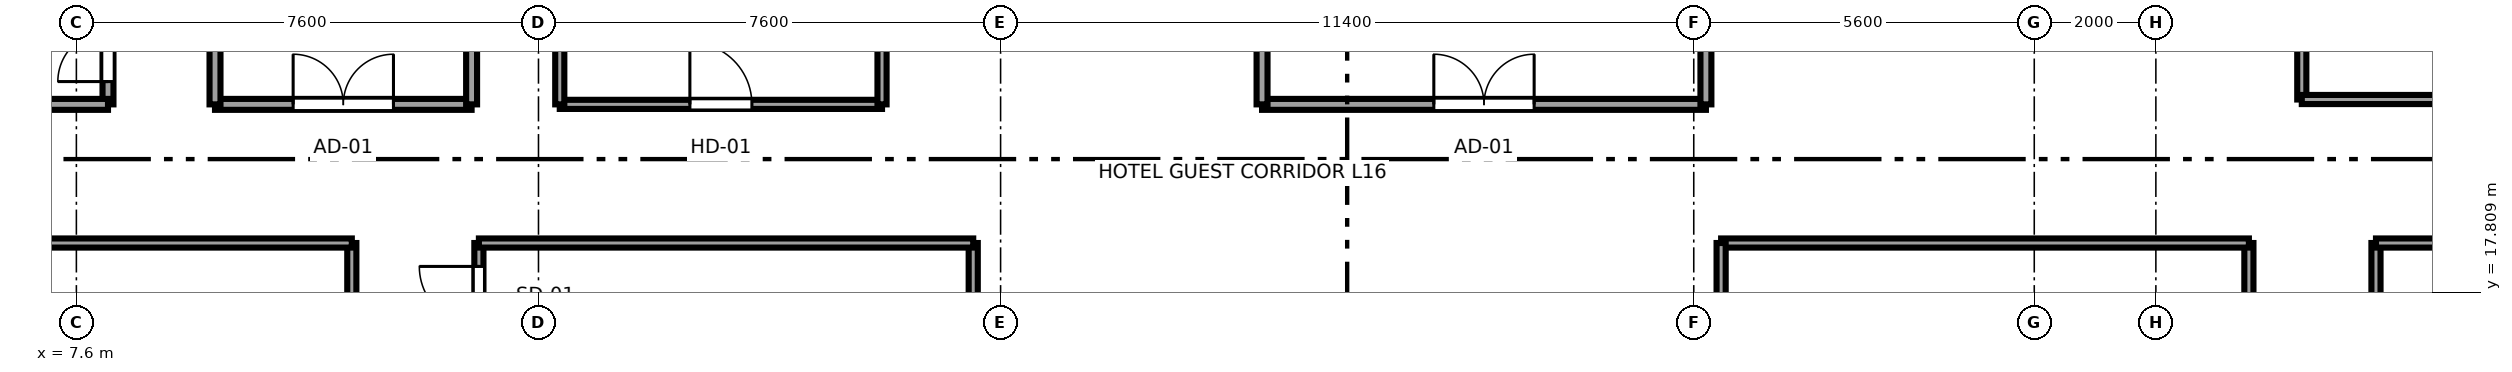
"""IFC4 building model, lengths in metres.
Left out: names, types, materials, properties, quantities, classifications, styles, units other than length and angle.
Written with IfcOpenShell. Run it as: python <this file> out.ifc"""

import sys

from ifc_helpers import new_model, si_unit, direction, frame, frame_2d, origin, place, context, subcontext, project, spatial, rectangle, extrude, source, transform, mapped, element, fill, save


model = new_model("IFC4")
c1 = context("Model", 3, precision=1e-05, world=origin(), true_north=direction((0.0, 1.0)))
c2 = subcontext(c1, "Body", "Model", "MODEL_VIEW")
j1 = project(units=[si_unit("LENGTHUNIT", "METRE"), si_unit("PLANEANGLEUNIT", "RADIAN")], contexts=[c1])
p1 = place(None, origin())
s1 = spatial("IfcSite", under=j1, at=p1, CompositionType="ELEMENT")
p2 = place(p1, origin())
s2 = spatial("IfcBuilding", under=s1, at=p2, CompositionType="ELEMENT")
p3 = place(p2, frame((0.0, 0.0, 67.5)))
s3 = spatial("IfcBuildingStorey", under=s2, at=p3, CompositionType="ELEMENT", Elevation=67.5)
p4 = place(p3, frame((12.13, 11.81, 0.0), z_axis=(0.0, 0.0, 1.0), x_axis=(0.0, 1.0, 0.0)))
e1 = element("IfcWall", 1, at=p4, inside=s3, PredefinedType="PARTITIONING", context=c2, shape_type="SweptSolid", body=[
    extrude(rectangle(XDim=6.81, YDim=0.15, at=frame_2d((3.405, 0.0))), origin(), (0.0, 0.0, 1.0), 3.37),
])
p5 = place(p4, frame((2.895, 0.0, 0.0)))
e2 = element("IfcOpeningElement", 2, at=p5, cuts=e1, PredefinedType="OPENING", context=c2, shape_type="SweptSolid", body=[
    extrude(rectangle(XDim=0.98, YDim=2.12, at=frame_2d((0.49, 1.06))), frame((0.0, 0.085, 0.0), z_axis=(0.0, -1.0, 0.0), x_axis=(1.0, 0.0, 0.0)), (0.0, 0.0, 1.0), 0.17),
])
p6 = place(p3, frame((0.405, 18.62, 0.0), z_axis=(0.0, 0.0, 1.0), x_axis=(1.0, 0.0, 0.0)))
e3 = element("IfcWall", 3, at=p6, inside=s3, PredefinedType="PARTITIONING", context=c2, shape_type="SweptSolid", body=[
    extrude(rectangle(XDim=11.725, YDim=0.15, at=frame_2d((5.862, 0.0))), origin(), (0.0, 0.0, 1.0), 3.37),
])
p7 = place(p3, frame((14.22, 15.01, 0.0), z_axis=(0.0, 0.0, 1.0), x_axis=(0.0, 1.0, 0.0)))
e4 = element("IfcWall", 4, at=p7, inside=s3, PredefinedType="PARTITIONING", context=c2, shape_type="SweptSolid", body=[
    extrude(rectangle(XDim=3.61, YDim=0.15, at=frame_2d((1.805, 0.0))), origin(), (0.0, 0.0, 1.0), 3.37),
])
p8 = place(p7, frame((2.245, 0.0, 0.0)))
e5 = element("IfcOpeningElement", 5, at=p8, cuts=e4, PredefinedType="OPENING", context=c2, shape_type="SweptSolid", body=[
    extrude(rectangle(XDim=0.98, YDim=2.12, at=frame_2d((0.49, 1.06))), frame((0.0, 0.085, 0.0), z_axis=(0.0, -1.0, 0.0), x_axis=(1.0, 0.0, 0.0)), (0.0, 0.0, 1.0), 0.17),
])
p9 = place(p3, frame((22.35, 12.68, 0.0), z_axis=(0.0, 0.0, 1.0), x_axis=(0.0, 1.0, 0.0)))
e6 = element("IfcWall", 6, at=p9, inside=s3, PredefinedType="PARTITIONING", context=c2, shape_type="SweptSolid", body=[
    extrude(rectangle(XDim=5.94, YDim=0.15, at=frame_2d((2.97, 0.0))), origin(), (0.0, 0.0, 1.0), 3.37),
])
p10 = place(p3, frame((14.22, 18.62, 0.0), z_axis=(0.0, 0.0, 1.0), x_axis=(1.0, 0.0, 0.0)))
e7 = element("IfcWall", 7, at=p10, inside=s3, PredefinedType="PARTITIONING", context=c2, shape_type="SweptSolid", body=[
    extrude(rectangle(XDim=8.13, YDim=0.15, at=frame_2d((4.065, 0.0))), origin(), (0.0, 0.0, 1.0), 3.37),
])
p11 = place(p3, frame((43.33, 11.61, 0.0), z_axis=(0.0, 0.0, 1.0), x_axis=(0.0, 1.0, 0.0)))
e8 = element("IfcWall", 8, at=p11, inside=s3, PredefinedType="PARTITIONING", context=c2, shape_type="SweptSolid", body=[
    extrude(rectangle(XDim=7.01, YDim=0.15, at=frame_2d((3.505, 0.0))), origin(), (0.0, 0.0, 1.0), 3.37),
])
p12 = place(p11, frame((2.995, 0.0, 0.0)))
e9 = element("IfcOpeningElement", 9, at=p12, cuts=e8, PredefinedType="OPENING", context=c2, shape_type="SweptSolid", body=[
    extrude(rectangle(XDim=0.98, YDim=2.12, at=frame_2d((0.49, 1.06))), frame((0.0, 0.085, 0.0), z_axis=(0.0, -1.0, 0.0), x_axis=(1.0, 0.0, 0.0)), (0.0, 0.0, 1.0), 0.17),
])
p13 = place(p3, frame((34.65, 18.62, 0.0), z_axis=(0.0, 0.0, 1.0), x_axis=(1.0, 0.0, 0.0)))
e10 = element("IfcWall", 10, at=p13, inside=s3, PredefinedType="PARTITIONING", context=c2, shape_type="SweptSolid", body=[
    extrude(rectangle(XDim=8.68, YDim=0.15, at=frame_2d((4.34, 0.0))), origin(), (0.0, 0.0, 1.0), 3.37),
])
p14 = place(p3, frame((34.65, 9.28, 0.0), z_axis=(0.0, 0.0, 1.0), x_axis=(0.0, 1.0, 0.0)))
e11 = element("IfcWall", 11, at=p14, inside=s3, PredefinedType="PARTITIONING", context=c2, shape_type="SweptSolid", body=[
    extrude(rectangle(XDim=9.34, YDim=0.15, at=frame_2d((4.67, 0.0))), origin(), (0.0, 0.0, 1.0), 3.37),
])
p15 = place(p3, frame((45.42, 15.81, 0.0), z_axis=(0.0, 0.0, 1.0), x_axis=(0.0, 1.0, 0.0)))
e12 = element("IfcWall", 12, at=p15, inside=s3, PredefinedType="PARTITIONING", context=c2, shape_type="SweptSolid", body=[
    extrude(rectangle(XDim=2.81, YDim=0.15, at=frame_2d((1.405, 0.0))), origin(), (0.0, 0.0, 1.0), 3.37),
])
p16 = place(p15, frame((0.895, 0.0, 0.0)))
e13 = element("IfcOpeningElement", 13, at=p16, cuts=e12, PredefinedType="OPENING", context=c2, shape_type="SweptSolid", body=[
    extrude(rectangle(XDim=0.98, YDim=2.12, at=frame_2d((0.49, 1.06))), frame((0.0, 0.085, 0.0), z_axis=(0.0, -1.0, 0.0), x_axis=(1.0, 0.0, 0.0)), (0.0, 0.0, 1.0), 0.17),
])
p17 = place(p3, frame((45.42, 18.62, 0.0), z_axis=(0.0, 0.0, 1.0), x_axis=(1.0, 0.0, 0.0)))
e14 = element("IfcWall", 14, at=p17, inside=s3, PredefinedType="PARTITIONING", context=c2, shape_type="SweptSolid", body=[
    extrude(rectangle(XDim=11.175, YDim=0.15, at=frame_2d((5.587, 0.0))), origin(), (0.0, 0.0, 1.0), 3.37),
])
p18 = place(p3, frame((8.12, 20.9, 0.0), z_axis=(0.0, 0.0, 1.0), x_axis=(0.0, 1.0, 0.0)))
e15 = element("IfcWall", 15, at=p18, inside=s3, PredefinedType="PARTITIONING", context=c2, shape_type="SweptSolid", body=[
    extrude(rectangle(XDim=5.2, YDim=0.18, at=frame_2d((2.6, 0.0))), origin(), (0.0, 0.0, 1.0), 3.37),
])
p19 = place(p18, frame((0.375, 0.0, 0.0)))
e16 = element("IfcOpeningElement", 16, at=p19, cuts=e15, PredefinedType="OPENING", context=c2, shape_type="SweptSolid", body=[
    extrude(rectangle(XDim=1.65, YDim=2.15, at=frame_2d((0.825, 1.075))), frame((0.0, 0.1, 0.0), z_axis=(0.0, -1.0, 0.0), x_axis=(1.0, 0.0, 0.0)), (0.0, 0.0, 1.0), 0.2),
])
p20 = place(p3, frame((0.405, 20.9, 0.0), z_axis=(0.0, 0.0, 1.0), x_axis=(1.0, 0.0, 0.0)))
e17 = element("IfcWall", 17, at=p20, inside=s3, PredefinedType="PARTITIONING", context=c2, shape_type="SweptSolid", body=[
    extrude(rectangle(XDim=7.715, YDim=0.18, at=frame_2d((3.857, 0.0))), origin(), (0.0, 0.0, 1.0), 3.37),
])
p21 = place(p3, frame((44.2, 20.98, 0.0), z_axis=(0.0, 0.0, 1.0), x_axis=(0.0, 1.0, 0.0)))
e18 = element("IfcWall", 18, at=p21, inside=s3, PredefinedType="PARTITIONING", context=c2, shape_type="SweptSolid", body=[
    extrude(rectangle(XDim=5.69, YDim=0.15, at=frame_2d((2.845, 0.0))), origin(), (0.0, 0.0, 1.0), 3.37),
])
p22 = place(p21, frame((2.355, 0.0, 0.0)))
e19 = element("IfcOpeningElement", 19, at=p22, cuts=e18, PredefinedType="OPENING", context=c2, shape_type="SweptSolid", body=[
    extrude(rectangle(XDim=0.98, YDim=2.12, at=frame_2d((0.49, 1.06))), frame((0.0, 0.085, 0.0), z_axis=(0.0, -1.0, 0.0), x_axis=(1.0, 0.0, 0.0)), (0.0, 0.0, 1.0), 0.17),
])
p23 = place(p3, frame((44.2, 20.98, 0.0), z_axis=(0.0, 0.0, 1.0), x_axis=(1.0, 0.0, 0.0)))
e20 = element("IfcWall", 20, at=p23, inside=s3, PredefinedType="PARTITIONING", context=c2, shape_type="SweptSolid", body=[
    extrude(rectangle(XDim=12.395, YDim=0.15, at=frame_2d((6.198, 0.0))), origin(), (0.0, 0.0, 1.0), 3.37),
])
p24 = place(p3, frame((9.88, 20.9, 0.0), z_axis=(0.0, 0.0, 1.0), x_axis=(1.0, 0.0, 0.0)))
e21 = element("IfcWall", 21, at=p24, inside=s3, PredefinedType="PARTITIONING", context=c2, shape_type="SweptSolid", body=[
    extrude(rectangle(XDim=4.22, YDim=0.18, at=frame_2d((2.11, 0.0))), origin(), (0.0, 0.0, 1.0), 3.37),
])
p25 = place(p24, frame((1.285, 0.0, 0.0)))
e22 = element("IfcOpeningElement", 22, at=p25, cuts=e21, PredefinedType="OPENING", context=c2, shape_type="SweptSolid", body=[
    extrude(rectangle(XDim=1.65, YDim=2.15, at=frame_2d((0.825, 1.075))), frame((0.0, 0.1, 0.0), z_axis=(0.0, -1.0, 0.0), x_axis=(1.0, 0.0, 0.0)), (0.0, 0.0, 1.0), 0.2),
])
for number, where, z_axis, x_axis in (
    (23, (9.88, 20.9, 0.0), (0.0, 0.0, 1.0), (0.0, 1.0, 0.0)),
    (24, (14.1, 20.9, 0.0), (0.0, 0.0, 1.0), (0.0, 1.0, 0.0)),
):
    element("IfcWall", number, at=place(p3, frame(where, z_axis=z_axis, x_axis=x_axis)), inside=s3, PredefinedType="PARTITIONING", context=c2, shape_type="SweptSolid", body=[
        extrude(rectangle(XDim=8.85, YDim=0.18, at=frame_2d((4.425, 0.0))), origin(), (0.0, 0.0, 1.0), 3.37),
    ])
p26 = place(p3, frame((27.1, 20.9, 0.0), z_axis=(0.0, 0.0, 1.0), x_axis=(1.0, 0.0, 0.0)))
e25 = element("IfcWall", 25, at=p26, inside=s3, PredefinedType="PARTITIONING", context=c2, shape_type="SweptSolid", body=[
    extrude(rectangle(XDim=7.3, YDim=0.18, at=frame_2d((3.65, 0.0))), origin(), (0.0, 0.0, 1.0), 3.37),
])
p27 = place(p26, frame((2.825, 0.0, 0.0)))
e26 = element("IfcOpeningElement", 26, at=p27, cuts=e25, PredefinedType="OPENING", context=c2, shape_type="SweptSolid", body=[
    extrude(rectangle(XDim=1.65, YDim=2.15, at=frame_2d((0.825, 1.075))), frame((0.0, 0.1, 0.0), z_axis=(0.0, -1.0, 0.0), x_axis=(1.0, 0.0, 0.0)), (0.0, 0.0, 1.0), 0.2),
])
for number, where, z_axis, x_axis in (
    (27, (27.1, 20.9, 0.0), (0.0, 0.0, 1.0), (0.0, 1.0, 0.0)),
    (28, (34.4, 20.9, 0.0), (0.0, 0.0, 1.0), (0.0, 1.0, 0.0)),
):
    element("IfcWall", number, at=place(p3, frame(where, z_axis=z_axis, x_axis=x_axis)), inside=s3, PredefinedType="PARTITIONING", context=c2, shape_type="SweptSolid", body=[
        extrude(rectangle(XDim=8.9, YDim=0.18, at=frame_2d((4.45, 0.0))), origin(), (0.0, 0.0, 1.0), 3.37),
    ])
p28 = place(p3, frame((15.55, 20.9, 0.0), z_axis=(0.0, 0.0, 1.0), x_axis=(1.0, 0.0, 0.0)))
e29 = element("IfcWall", 29, at=p28, inside=s3, PredefinedType="PARTITIONING", context=c2, shape_type="SweptSolid", body=[
    extrude(rectangle(XDim=5.3, YDim=0.15, at=frame_2d((2.65, 0.0))), origin(), (0.0, 0.0, 1.0), 3.37),
])
p29 = place(p28, frame((2.14, 0.0, 0.0)))
e30 = element("IfcOpeningElement", 30, at=p29, cuts=e29, PredefinedType="OPENING", context=c2, shape_type="SweptSolid", body=[
    extrude(rectangle(XDim=1.02, YDim=2.03, at=frame_2d((0.51, 1.015))), frame((0.0, 0.085, 0.0), z_axis=(0.0, -1.0, 0.0), x_axis=(1.0, 0.0, 0.0)), (0.0, 0.0, 1.0), 0.17),
])
for number, where, z_axis, x_axis in (
    (31, (15.55, 20.9, 0.0), (0.0, 0.0, 1.0), (0.0, 1.0, 0.0)),
    (32, (20.85, 20.9, 0.0), (0.0, 0.0, 1.0), (0.0, 1.0, 0.0)),
):
    element("IfcWall", number, at=place(p3, frame(where, z_axis=z_axis, x_axis=x_axis)), inside=s3, PredefinedType="PARTITIONING", context=c2, shape_type="SweptSolid", body=[
        extrude(rectangle(XDim=8.9, YDim=0.15, at=frame_2d((4.45, 0.0))), origin(), (0.0, 0.0, 1.0), 3.37),
    ])
m1 = source(origin(), c2, "Body", "SweptSolid", [
    extrude(rectangle(XDim=0.98, YDim=2.12, at=frame_2d((0.49, 1.06))), frame((0.0, 0.025, 0.0), z_axis=(0.0, -1.0, 0.0), x_axis=(1.0, 0.0, 0.0)), (0.0, 0.0, 1.0), 0.05),
])
p30 = place(p8, origin())
e33 = element("IfcDoor", 33, at=p30, inside=s3, OperationType="SINGLE_SWING_RIGHT", PredefinedType="DOOR", context=c2, shape_type="MappedRepresentation", body=[
    mapped(m1, transform((0.0, 0.0, 0.0), x_axis=(1.0, 0.0, 0.0), y_axis=(0.0, 1.0, 0.0), z_axis=(0.0, 0.0, 1.0), scale=1.0)),
])
fill(e5, e33)
m2 = source(origin(), c2, "Body", "SweptSolid", [
    extrude(rectangle(XDim=1.65, YDim=2.15, at=frame_2d((0.825, 1.075))), frame((0.0, 0.025, 0.0), z_axis=(0.0, -1.0, 0.0), x_axis=(1.0, 0.0, 0.0)), (0.0, 0.0, 1.0), 0.05),
])
p31 = place(p19, origin())
e34 = element("IfcDoor", 34, at=p31, inside=s3, OperationType="DOUBLE_DOOR_SINGLE_SWING", PredefinedType="DOOR", context=c2, shape_type="MappedRepresentation", body=[
    mapped(m2, transform((0.0, 0.0, 0.0), x_axis=(1.0, 0.0, 0.0), y_axis=(0.0, 1.0, 0.0), z_axis=(0.0, 0.0, 1.0), scale=1.0)),
])
fill(e16, e34)
p32 = place(p25, origin())
e35 = element("IfcDoor", 35, at=p32, inside=s3, OperationType="DOUBLE_DOOR_SINGLE_SWING", PredefinedType="DOOR", context=c2, shape_type="MappedRepresentation", body=[
    mapped(m2, transform((0.0, 0.0, 0.0), x_axis=(1.0, 0.0, 0.0), y_axis=(0.0, 1.0, 0.0), z_axis=(0.0, 0.0, 1.0), scale=1.0)),
])
fill(e22, e35)
p33 = place(p27, origin())
e36 = element("IfcDoor", 36, at=p33, inside=s3, OperationType="DOUBLE_DOOR_SINGLE_SWING", PredefinedType="DOOR", context=c2, shape_type="MappedRepresentation", body=[
    mapped(m2, transform((0.0, 0.0, 0.0), x_axis=(1.0, 0.0, 0.0), y_axis=(0.0, 1.0, 0.0), z_axis=(0.0, 0.0, 1.0), scale=1.0)),
])
fill(e26, e36)
m3 = source(origin(), c2, "Body", "SweptSolid", [
    extrude(rectangle(XDim=1.02, YDim=2.03, at=frame_2d((0.51, 1.015))), frame((0.0, 0.025, 0.0), z_axis=(0.0, -1.0, 0.0), x_axis=(1.0, 0.0, 0.0)), (0.0, 0.0, 1.0), 0.05),
])
p34 = place(p29, origin())
e37 = element("IfcDoor", 37, at=p34, inside=s3, OperationType="SINGLE_SWING_LEFT", PredefinedType="DOOR", context=c2, shape_type="MappedRepresentation", body=[
    mapped(m3, transform((0.0, 0.0, 0.0), x_axis=(1.0, 0.0, 0.0), y_axis=(0.0, 1.0, 0.0), z_axis=(0.0, 0.0, 1.0), scale=1.0)),
])
fill(e30, e37)
save(model, sys.argv[1])
